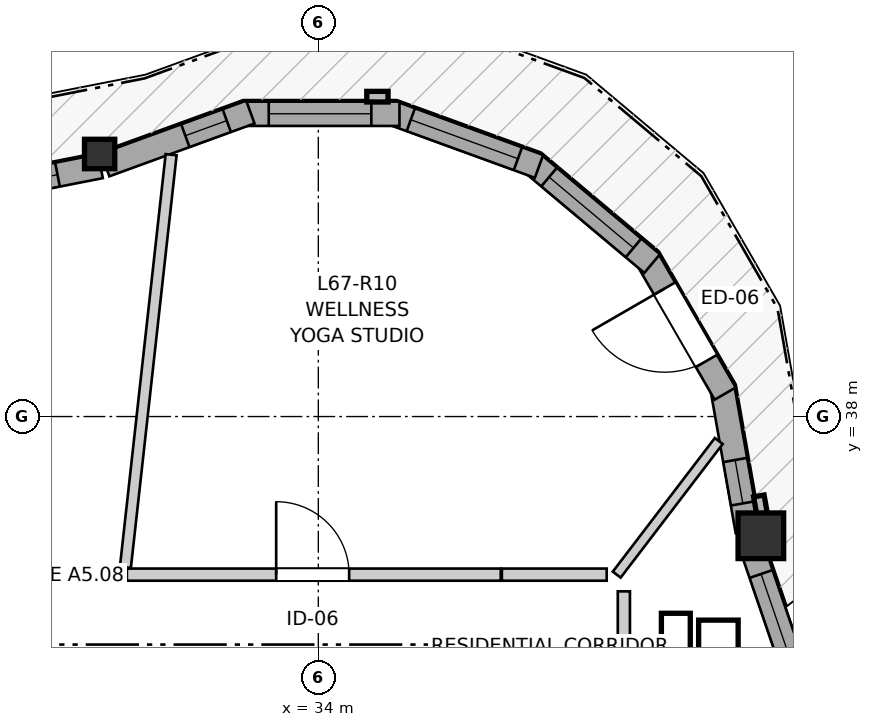
"""IFC4 building model, lengths in metres.
Left out: names, types, materials, properties, quantities, classifications, styles, units other than length and angle.
Written with IfcOpenShell. Run it as: python <this file> out.ifc"""

import sys

from ifc_helpers import new_model, si_unit, direction, frame, frame_2d, origin, origin_2d, place, context, subcontext, project, spatial, rectangle, i_section, extrude, source, transform, mapped, element, fill, save


model = new_model("IFC4")
c1 = context("Model", 3, precision=1e-05, world=origin(), true_north=direction((0.0, 1.0)))
c2 = subcontext(c1, "Body", "Model", "MODEL_VIEW")
j1 = project(units=[si_unit("LENGTHUNIT", "METRE"), si_unit("PLANEANGLEUNIT", "RADIAN")], contexts=[c1])
p1 = place(None, origin())
s1 = spatial("IfcSite", under=j1, at=p1, CompositionType="ELEMENT")
p2 = place(p1, origin())
s2 = spatial("IfcBuilding", under=s1, at=p2, CompositionType="ELEMENT")
p3 = place(p2, frame((0.0, 0.0, 224.4)))
s3 = spatial("IfcBuildingStorey", under=s2, at=p3, CompositionType="ELEMENT", Elevation=224.4)
m1 = source(origin(), c2, "Body", "SweptSolid", [
    extrude(rectangle(XDim=0.6, YDim=0.6, at=origin_2d()), origin(), (0.0, 0.0, 1.0), 2.96),
])
p4 = place(p3, frame((39.823, 36.431, 0.0), z_axis=(0.0, 0.0, 1.0), x_axis=(1.0, 0.0, 0.0)))
e1 = element("IfcColumn", 1, at=p4, inside=s3, PredefinedType="COLUMN", context=c2, shape_type="MappedRepresentation", body=[
    mapped(m1, transform((0.0, 0.0, 0.0), x_axis=(1.0, 0.0, 0.0), y_axis=(0.0, 1.0, 0.0), z_axis=(0.0, 0.0, 1.0), scale=1.0)),
])
m2 = source(origin(), c2, "Body", "SweptSolid", [
    extrude(i_section(OverallWidth=0.398, OverallDepth=0.387, WebThickness=0.019, FlangeThickness=0.03, FilletRadius=0.015, at=origin_2d()), origin(), (0.0, 0.0, 1.0), 2.96),
])
p5 = place(p3, frame((31.123, 41.454, 0.0), z_axis=(0.0, 0.0, 1.0), x_axis=(1.0, 0.0, 0.0)))
e2 = element("IfcColumn", 2, at=p5, inside=s3, PredefinedType="PILASTER", context=c2, shape_type="MappedRepresentation", body=[
    mapped(m2, transform((0.0, 0.0, 0.0), x_axis=(1.0, 0.0, 0.0), y_axis=(0.0, 1.0, 0.0), z_axis=(0.0, 0.0, 1.0), scale=1.0)),
])
p6 = place(p3, frame((40.397, 34.257, 0.0), z_axis=(0.0, 0.0, 1.0), x_axis=(-0.323634249216, 0.9461822619, 0.0)))
e3 = element("IfcWall", 3, at=p6, inside=s3, PredefinedType="SOLIDWALL", context=c2, shape_type="SweptSolid", body=[
    extrude(rectangle(XDim=2.153, YDim=0.32, at=frame_2d((1.077, 0.0))), origin(), (0.0, 0.0, 1.0), 2.58),
])
p7 = place(p6, frame((0.316, 0.0, 0.82)))
e4 = element("IfcOpeningElement", 4, at=p7, cuts=e3, PredefinedType="OPENING", context=c2, shape_type="SweptSolid", body=[
    extrude(rectangle(XDim=1.45, YDim=1.25, at=frame_2d((0.725, 0.625))), frame((0.0, 0.17, 0.0), z_axis=(0.0, -1.0, 0.0), x_axis=(1.0, 0.0, 0.0)), (0.0, 0.0, 1.0), 0.34),
])
p8 = place(p3, frame((39.649, 36.492, 0.0), z_axis=(0.0, 0.0, 1.0), x_axis=(-0.173693060482, 0.984799837906, 0.0)))
e5 = element("IfcWall", 5, at=p8, inside=s3, PredefinedType="SOLIDWALL", context=c2, shape_type="SweptSolid", body=[
    extrude(rectangle(XDim=1.962, YDim=0.32, at=frame_2d((0.981, 0.0))), origin(), (0.0, 0.0, 1.0), 2.58),
])
p9 = place(p8, frame((0.371, 0.0, 0.82)))
e6 = element("IfcOpeningElement", 6, at=p9, cuts=e5, PredefinedType="OPENING", context=c2, shape_type="SweptSolid", body=[
    extrude(rectangle(XDim=0.58, YDim=1.35, at=frame_2d((0.29, 0.675))), frame((0.0, 0.17, 0.0), z_axis=(0.0, -1.0, 0.0), x_axis=(1.0, 0.0, 0.0)), (0.0, 0.0, 1.0), 0.34),
])
p10 = place(p3, frame((39.353, 38.302, 0.0), z_axis=(0.0, 0.0, 1.0), x_axis=(-0.49990781971, 0.866078617559, 0.0)))
e7 = element("IfcWall", 7, at=p10, inside=s3, PredefinedType="SOLIDWALL", context=c2, shape_type="SweptSolid", body=[
    extrude(rectangle(XDim=2.09, YDim=0.32, at=frame_2d((1.045, 0.0))), origin(), (0.0, 0.0, 1.0), 2.58),
])
p11 = place(p10, frame((0.495, 0.0, 0.0)))
e8 = element("IfcOpeningElement", 8, at=p11, cuts=e7, PredefinedType="OPENING", context=c2, shape_type="SweptSolid", body=[
    extrude(rectangle(XDim=1.1, YDim=2.1, at=frame_2d((0.55, 1.05))), frame((0.0, 0.17, 0.0), z_axis=(0.0, -1.0, 0.0), x_axis=(1.0, 0.0, 0.0)), (0.0, 0.0, 1.0), 0.34),
])
p12 = place(p3, frame((38.392, 40.012, 0.0), z_axis=(0.0, 0.0, 1.0), x_axis=(-0.766024572719, 0.642811289563, 0.0)))
e9 = element("IfcWall", 9, at=p12, inside=s3, PredefinedType="SOLIDWALL", context=c2, shape_type="SweptSolid", body=[
    extrude(rectangle(XDim=2.09, YDim=0.32, at=frame_2d((1.045, 0.0))), origin(), (0.0, 0.0, 1.0), 2.58),
])
p13 = place(p12, frame((0.32, 0.0, 0.82)))
e10 = element("IfcOpeningElement", 10, at=p13, cuts=e9, PredefinedType="OPENING", context=c2, shape_type="SweptSolid", body=[
    extrude(rectangle(XDim=1.45, YDim=1.25, at=frame_2d((0.725, 0.625))), frame((0.0, 0.17, 0.0), z_axis=(0.0, -1.0, 0.0), x_axis=(1.0, 0.0, 0.0)), (0.0, 0.0, 1.0), 0.34),
])
p14 = place(p3, frame((36.904, 41.291, 0.0), z_axis=(0.0, 0.0, 1.0), x_axis=(-0.939711556618, 0.341968113072, 0.0)))
e11 = element("IfcWall", 11, at=p14, inside=s3, PredefinedType="SOLIDWALL", context=c2, shape_type="SweptSolid", body=[
    extrude(rectangle(XDim=2.09, YDim=0.32, at=frame_2d((1.045, 0.0))), origin(), (0.0, 0.0, 1.0), 2.58),
])
p15 = place(p14, frame((0.295, 0.0, 0.82)))
e12 = element("IfcOpeningElement", 12, at=p15, cuts=e11, PredefinedType="OPENING", context=c2, shape_type="SweptSolid", body=[
    extrude(rectangle(XDim=1.5, YDim=1.45, at=frame_2d((0.75, 0.725))), frame((0.0, 0.17, 0.0), z_axis=(0.0, -1.0, 0.0), x_axis=(1.0, 0.0, 0.0)), (0.0, 0.0, 1.0), 0.34),
])
p16 = place(p3, frame((35.068, 41.983, 0.0), z_axis=(0.0, 0.0, 1.0), x_axis=(-1.0, 0.0, 0.0)))
e13 = element("IfcWall", 13, at=p16, inside=s3, PredefinedType="SOLIDWALL", context=c2, shape_type="SweptSolid", body=[
    extrude(rectangle(XDim=2.09, YDim=0.32, at=frame_2d((1.045, 0.0))), origin(), (0.0, 0.0, 1.0), 2.58),
])
p17 = place(p16, frame((0.37, 0.0, 0.82)))
e14 = element("IfcOpeningElement", 14, at=p17, cuts=e13, PredefinedType="OPENING", context=c2, shape_type="SweptSolid", body=[
    extrude(rectangle(XDim=1.35, YDim=1.45, at=frame_2d((0.675, 0.725))), frame((0.0, 0.17, 0.0), z_axis=(0.0, -1.0, 0.0), x_axis=(1.0, 0.0, 0.0)), (0.0, 0.0, 1.0), 0.34),
])
p18 = place(p3, frame((33.106, 42.006, 0.0), z_axis=(0.0, 0.0, 1.0), x_axis=(-0.939691662178, -0.342022777067, 0.0)))
e15 = element("IfcWall", 15, at=p18, inside=s3, PredefinedType="SOLIDWALL", context=c2, shape_type="SweptSolid", body=[
    extrude(rectangle(XDim=2.032, YDim=0.32, at=frame_2d((1.016, 0.0))), origin(), (0.0, 0.0, 1.0), 2.58),
])
p19 = place(p18, frame((0.33, 0.0, 0.82)))
e16 = element("IfcOpeningElement", 16, at=p19, cuts=e15, PredefinedType="OPENING", context=c2, shape_type="SweptSolid", body=[
    extrude(rectangle(XDim=0.58, YDim=1.35, at=frame_2d((0.29, 0.675))), frame((0.0, 0.17, 0.0), z_axis=(0.0, -1.0, 0.0), x_axis=(1.0, 0.0, 0.0)), (0.0, 0.0, 1.0), 0.34),
])
p20 = place(p3, frame((31.134, 41.293, 0.0), z_axis=(0.0, 0.0, 1.0), x_axis=(-0.981246594798, -0.19275663464, 0.0)))
e17 = element("IfcWall", 17, at=p20, inside=s3, PredefinedType="SOLIDWALL", context=c2, shape_type="SweptSolid", body=[
    extrude(rectangle(XDim=2.223, YDim=0.32, at=frame_2d((1.111, 0.0))), origin(), (0.0, 0.0, 1.0), 2.58),
])
p21 = place(p20, frame((0.576, 0.0, 0.82)))
e18 = element("IfcOpeningElement", 18, at=p21, cuts=e17, PredefinedType="OPENING", context=c2, shape_type="SweptSolid", body=[
    extrude(rectangle(XDim=1.05, YDim=1.45, at=frame_2d((0.525, 0.725))), frame((0.0, 0.17, 0.0), z_axis=(0.0, -1.0, 0.0), x_axis=(1.0, 0.0, 0.0)), (0.0, 0.0, 1.0), 0.34),
])
p22 = place(p3, frame((26.138, 35.92, 0.0), z_axis=(0.0, 0.0, 1.0), x_axis=(1.0, 0.0, 0.0)))
e19 = element("IfcWall", 19, at=p22, inside=s3, PredefinedType="PARTITIONING", context=c2, shape_type="SweptSolid", body=[
    extrude(rectangle(XDim=5.328, YDim=0.16, at=frame_2d((2.664, 0.0))), origin(), (0.0, 0.0, 1.0), 2.96),
])
p23 = place(p22, frame((2.185, 0.0, 0.0)))
e20 = element("IfcOpeningElement", 20, at=p23, cuts=e19, PredefinedType="OPENING", context=c2, shape_type="SweptSolid", body=[
    extrude(rectangle(XDim=0.96, YDim=2.1, at=frame_2d((0.48, 1.05))), frame((0.0, 0.09, 0.0), z_axis=(0.0, -1.0, 0.0), x_axis=(1.0, 0.0, 0.0)), (0.0, 0.0, 1.0), 0.18),
])
p24 = place(p3, frame((31.481, 35.92, 0.0), z_axis=(0.0, 0.0, 1.0), x_axis=(1.0, 0.0, 0.0)))
e21 = element("IfcWall", 21, at=p24, inside=s3, PredefinedType="PARTITIONING", context=c2, shape_type="SweptSolid", body=[
    extrude(rectangle(XDim=4.919, YDim=0.16, at=frame_2d((2.459, 0.0))), origin(), (0.0, 0.0, 1.0), 2.598),
])
p25 = place(p24, frame((1.965, 0.0, 0.0)))
e22 = element("IfcOpeningElement", 22, at=p25, cuts=e21, PredefinedType="OPENING", context=c2, shape_type="SweptSolid", body=[
    extrude(rectangle(XDim=0.96, YDim=2.1, at=frame_2d((0.48, 1.05))), frame((0.0, 0.09, 0.0), z_axis=(0.0, -1.0, 0.0), x_axis=(1.0, 0.0, 0.0)), (0.0, 0.0, 1.0), 0.18),
])
p26 = place(p3, frame((31.462, 36.016, 0.0), z_axis=(0.0, 0.0, 1.0), x_axis=(0.11018132109, 0.993911503346, 0.0)))
e23 = element("IfcWall", 23, at=p26, inside=s3, PredefinedType="PARTITIONING", context=c2, shape_type="SweptSolid", body=[
    extrude(rectangle(XDim=5.462, YDim=0.145, at=frame_2d((2.731, 0.0))), origin(), (0.0, 0.0, 1.0), 2.96),
])
p27 = place(p3, frame((37.926, 35.92, 0.0), z_axis=(0.0, 0.0, 1.0), x_axis=(0.606987113509, 0.794711673523, 0.0)))
e24 = element("IfcWall", 24, at=p27, inside=s3, PredefinedType="PARTITIONING", context=c2, shape_type="SweptSolid", body=[
    extrude(rectangle(XDim=2.212, YDim=0.13, at=frame_2d((1.106, 0.0))), origin(), (0.0, 0.0, 1.0), 2.96),
])
p28 = place(p3, frame((38.02, 34.315, 0.0), z_axis=(0.0, 0.0, 1.0), x_axis=(0.0, 1.0, 0.0)))
e25 = element("IfcWall", 25, at=p28, inside=s3, PredefinedType="PARTITIONING", context=c2, shape_type="SweptSolid", body=[
    extrude(rectangle(XDim=1.385, YDim=0.16, at=frame_2d((0.693, 0.0))), origin(), (0.0, 0.0, 1.0), 2.96),
])
p29 = place(p3, frame((36.415, 35.92, 0.0), z_axis=(0.0, 0.0, 1.0), x_axis=(1.0, 0.0, 0.0)))
e26 = element("IfcWall", 26, at=p29, inside=s3, PredefinedType="PARTITIONING", context=c2, shape_type="SweptSolid", body=[
    extrude(rectangle(XDim=1.379, YDim=0.16, at=frame_2d((0.689, 0.0))), origin(), (0.0, 0.0, 1.0), 2.598),
])
m3 = source(origin(), c2, "Body", "SweptSolid", [
    extrude(rectangle(XDim=1.45, YDim=1.25, at=frame_2d((0.725, 0.625))), frame((0.0, 0.03, 0.0), z_axis=(0.0, -1.0, 0.0), x_axis=(1.0, 0.0, 0.0)), (0.0, 0.0, 1.0), 0.06),
])
p30 = place(p7, origin())
e27 = element("IfcWindow", 27, at=p30, inside=s3, PartitioningType="SINGLE_PANEL", PredefinedType="WINDOW", context=c2, shape_type="MappedRepresentation", body=[
    mapped(m3, transform((0.0, 0.0, 0.0), x_axis=(1.0, 0.0, 0.0), y_axis=(0.0, 1.0, 0.0), z_axis=(0.0, 0.0, 1.0), scale=1.0)),
])
fill(e4, e27)
m4 = source(origin(), c2, "Body", "SweptSolid", [
    extrude(rectangle(XDim=0.58, YDim=1.35, at=frame_2d((0.29, 0.675))), frame((0.0, 0.03, 0.0), z_axis=(0.0, -1.0, 0.0), x_axis=(1.0, 0.0, 0.0)), (0.0, 0.0, 1.0), 0.06),
])
p31 = place(p9, origin())
e28 = element("IfcWindow", 28, at=p31, inside=s3, PartitioningType="SINGLE_PANEL", PredefinedType="WINDOW", context=c2, shape_type="MappedRepresentation", body=[
    mapped(m4, transform((0.0, 0.0, 0.0), x_axis=(1.0, 0.0, 0.0), y_axis=(0.0, 1.0, 0.0), z_axis=(0.0, 0.0, 1.0), scale=1.0)),
])
fill(e6, e28)
m5 = source(origin(), c2, "Body", "SweptSolid", [
    extrude(rectangle(XDim=1.1, YDim=2.1, at=frame_2d((0.55, 1.05))), frame((0.0, 0.025, 0.0), z_axis=(0.0, -1.0, 0.0), x_axis=(1.0, 0.0, 0.0)), (0.0, 0.0, 1.0), 0.05),
])
p32 = place(p11, origin())
e29 = element("IfcDoor", 29, at=p32, inside=s3, OperationType="SINGLE_SWING_RIGHT", PredefinedType="DOOR", context=c2, shape_type="MappedRepresentation", body=[
    mapped(m5, transform((0.0, 0.0, 0.0), x_axis=(1.0, 0.0, 0.0), y_axis=(0.0, 1.0, 0.0), z_axis=(0.0, 0.0, 1.0), scale=1.0)),
])
fill(e8, e29)
p33 = place(p13, origin())
e30 = element("IfcWindow", 30, at=p33, inside=s3, PartitioningType="SINGLE_PANEL", PredefinedType="WINDOW", context=c2, shape_type="MappedRepresentation", body=[
    mapped(m3, transform((0.0, 0.0, 0.0), x_axis=(1.0, 0.0, 0.0), y_axis=(0.0, 1.0, 0.0), z_axis=(0.0, 0.0, 1.0), scale=1.0)),
])
fill(e10, e30)
m6 = source(origin(), c2, "Body", "SweptSolid", [
    extrude(rectangle(XDim=1.5, YDim=1.45, at=frame_2d((0.75, 0.725))), frame((0.0, 0.03, 0.0), z_axis=(0.0, -1.0, 0.0), x_axis=(1.0, 0.0, 0.0)), (0.0, 0.0, 1.0), 0.06),
])
p34 = place(p15, origin())
e31 = element("IfcWindow", 31, at=p34, inside=s3, PartitioningType="SINGLE_PANEL", PredefinedType="WINDOW", context=c2, shape_type="MappedRepresentation", body=[
    mapped(m6, transform((0.0, 0.0, 0.0), x_axis=(1.0, 0.0, 0.0), y_axis=(0.0, 1.0, 0.0), z_axis=(0.0, 0.0, 1.0), scale=1.0)),
])
fill(e12, e31)
m7 = source(origin(), c2, "Body", "SweptSolid", [
    extrude(rectangle(XDim=1.35, YDim=1.45, at=frame_2d((0.675, 0.725))), frame((0.0, 0.03, 0.0), z_axis=(0.0, -1.0, 0.0), x_axis=(1.0, 0.0, 0.0)), (0.0, 0.0, 1.0), 0.06),
])
p35 = place(p17, origin())
e32 = element("IfcWindow", 32, at=p35, inside=s3, PartitioningType="SINGLE_PANEL", PredefinedType="WINDOW", context=c2, shape_type="MappedRepresentation", body=[
    mapped(m7, transform((0.0, 0.0, 0.0), x_axis=(1.0, 0.0, 0.0), y_axis=(0.0, 1.0, 0.0), z_axis=(0.0, 0.0, 1.0), scale=1.0)),
])
fill(e14, e32)
p36 = place(p19, origin())
e33 = element("IfcWindow", 33, at=p36, inside=s3, PartitioningType="SINGLE_PANEL", PredefinedType="WINDOW", context=c2, shape_type="MappedRepresentation", body=[
    mapped(m4, transform((0.0, 0.0, 0.0), x_axis=(1.0, 0.0, 0.0), y_axis=(0.0, 1.0, 0.0), z_axis=(0.0, 0.0, 1.0), scale=1.0)),
])
fill(e16, e33)
m8 = source(origin(), c2, "Body", "SweptSolid", [
    extrude(rectangle(XDim=1.05, YDim=1.45, at=frame_2d((0.525, 0.725))), frame((0.0, 0.03, 0.0), z_axis=(0.0, -1.0, 0.0), x_axis=(1.0, 0.0, 0.0)), (0.0, 0.0, 1.0), 0.06),
])
p37 = place(p21, origin())
e34 = element("IfcWindow", 34, at=p37, inside=s3, PartitioningType="SINGLE_PANEL", PredefinedType="WINDOW", context=c2, shape_type="MappedRepresentation", body=[
    mapped(m8, transform((0.0, 0.0, 0.0), x_axis=(1.0, 0.0, 0.0), y_axis=(0.0, 1.0, 0.0), z_axis=(0.0, 0.0, 1.0), scale=1.0)),
])
fill(e18, e34)
m9 = source(origin(), c2, "Body", "SweptSolid", [
    extrude(rectangle(XDim=0.96, YDim=2.1, at=frame_2d((0.48, 1.05))), frame((0.0, 0.025, 0.0), z_axis=(0.0, -1.0, 0.0), x_axis=(1.0, 0.0, 0.0)), (0.0, 0.0, 1.0), 0.05),
])
p38 = place(p25, origin())
e35 = element("IfcDoor", 35, at=p38, inside=s3, OperationType="SINGLE_SWING_LEFT", PredefinedType="DOOR", context=c2, shape_type="MappedRepresentation", body=[
    mapped(m9, transform((0.0, 0.0, 0.0), x_axis=(1.0, 0.0, 0.0), y_axis=(0.0, 1.0, 0.0), z_axis=(0.0, 0.0, 1.0), scale=1.0)),
])
fill(e22, e35)
save(model, sys.argv[1])
